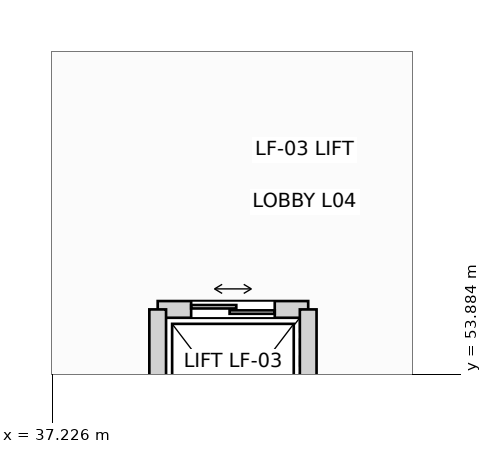
"""IFC4 building model, lengths in metres.
Left out: names, types, materials, properties, quantities, classifications, styles, units other than length and angle.
Written with IfcOpenShell. Run it as: python <this file> out.ifc"""

import sys

from ifc_helpers import new_model, si_unit, direction, frame, frame_2d, origin, place, context, subcontext, project, spatial, rectangle, extrude, element, fill, save


model = new_model("IFC4")
c1 = context("Model", 3, precision=1e-05, world=origin(), true_north=direction((0.0, 1.0)))
c2 = subcontext(c1, "Body", "Model", "MODEL_VIEW")
j1 = project(units=[si_unit("LENGTHUNIT", "METRE"), si_unit("PLANEANGLEUNIT", "RADIAN")], contexts=[c1])
p1 = place(None, origin())
s1 = spatial("IfcSite", under=j1, at=p1, CompositionType="ELEMENT")
p2 = place(p1, origin())
s2 = spatial("IfcBuilding", under=s1, at=p2, CompositionType="ELEMENT")
p3 = place(p2, frame((0.0, 0.0, 21.6)))
s3 = spatial("IfcBuildingStorey", under=s2, at=p3, CompositionType="ELEMENT", Elevation=21.6)
p4 = place(p3, frame((38.61, 54.74, 0.0), z_axis=(0.0, 0.0, 1.0), x_axis=(1.0, 0.0, 0.0)))
e1 = element("IfcWall", 1, at=p4, inside=s3, PredefinedType="PARTITIONING", context=c2, shape_type="SweptSolid", body=[
    extrude(rectangle(XDim=1.98, YDim=0.22, at=frame_2d((0.99, 0.0))), origin(), (0.0, 0.0, 1.0), 4.505),
])
p5 = place(p4, frame((0.44, 0.0, 0.0)))
e2 = element("IfcOpeningElement", 2, at=p5, cuts=e1, PredefinedType="OPENING", context=c2, shape_type="SweptSolid", body=[
    extrude(rectangle(XDim=1.1, YDim=2.18, at=frame_2d((0.55, 1.09))), frame((0.0, 0.12, 0.0), z_axis=(0.0, -1.0, 0.0), x_axis=(1.0, 0.0, 0.0)), (0.0, 0.0, 1.0), 0.24),
])
for number, where, z_axis, x_axis in (
    (3, (38.61, 52.26, 0.0), (0.0, 0.0, 1.0), (0.0, 1.0, 0.0)),
    (4, (40.59, 52.26, 0.0), (0.0, 0.0, 1.0), (0.0, 1.0, 0.0)),
):
    element("IfcWall", number, at=place(p3, frame(where, z_axis=z_axis, x_axis=x_axis)), inside=s3, PredefinedType="PARTITIONING", context=c2, shape_type="SweptSolid", body=[
        extrude(rectangle(XDim=2.48, YDim=0.22, at=frame_2d((1.24, 0.0))), origin(), (0.0, 0.0, 1.0), 4.505),
    ])
p6 = place(p5, origin())
e5 = element("IfcDoor", 5, at=p6, inside=s3, OperationType="DOUBLE_DOOR_SLIDING", PredefinedType="DOOR", context=c2, shape_type="SweptSolid", body=[
    extrude(rectangle(XDim=1.1, YDim=2.18, at=frame_2d((0.55, 1.09))), frame((0.0, 0.025, 0.0), z_axis=(0.0, -1.0, 0.0), x_axis=(1.0, 0.0, 0.0)), (0.0, 0.0, 1.0), 0.05),
])
fill(e2, e5)
save(model, sys.argv[1])
